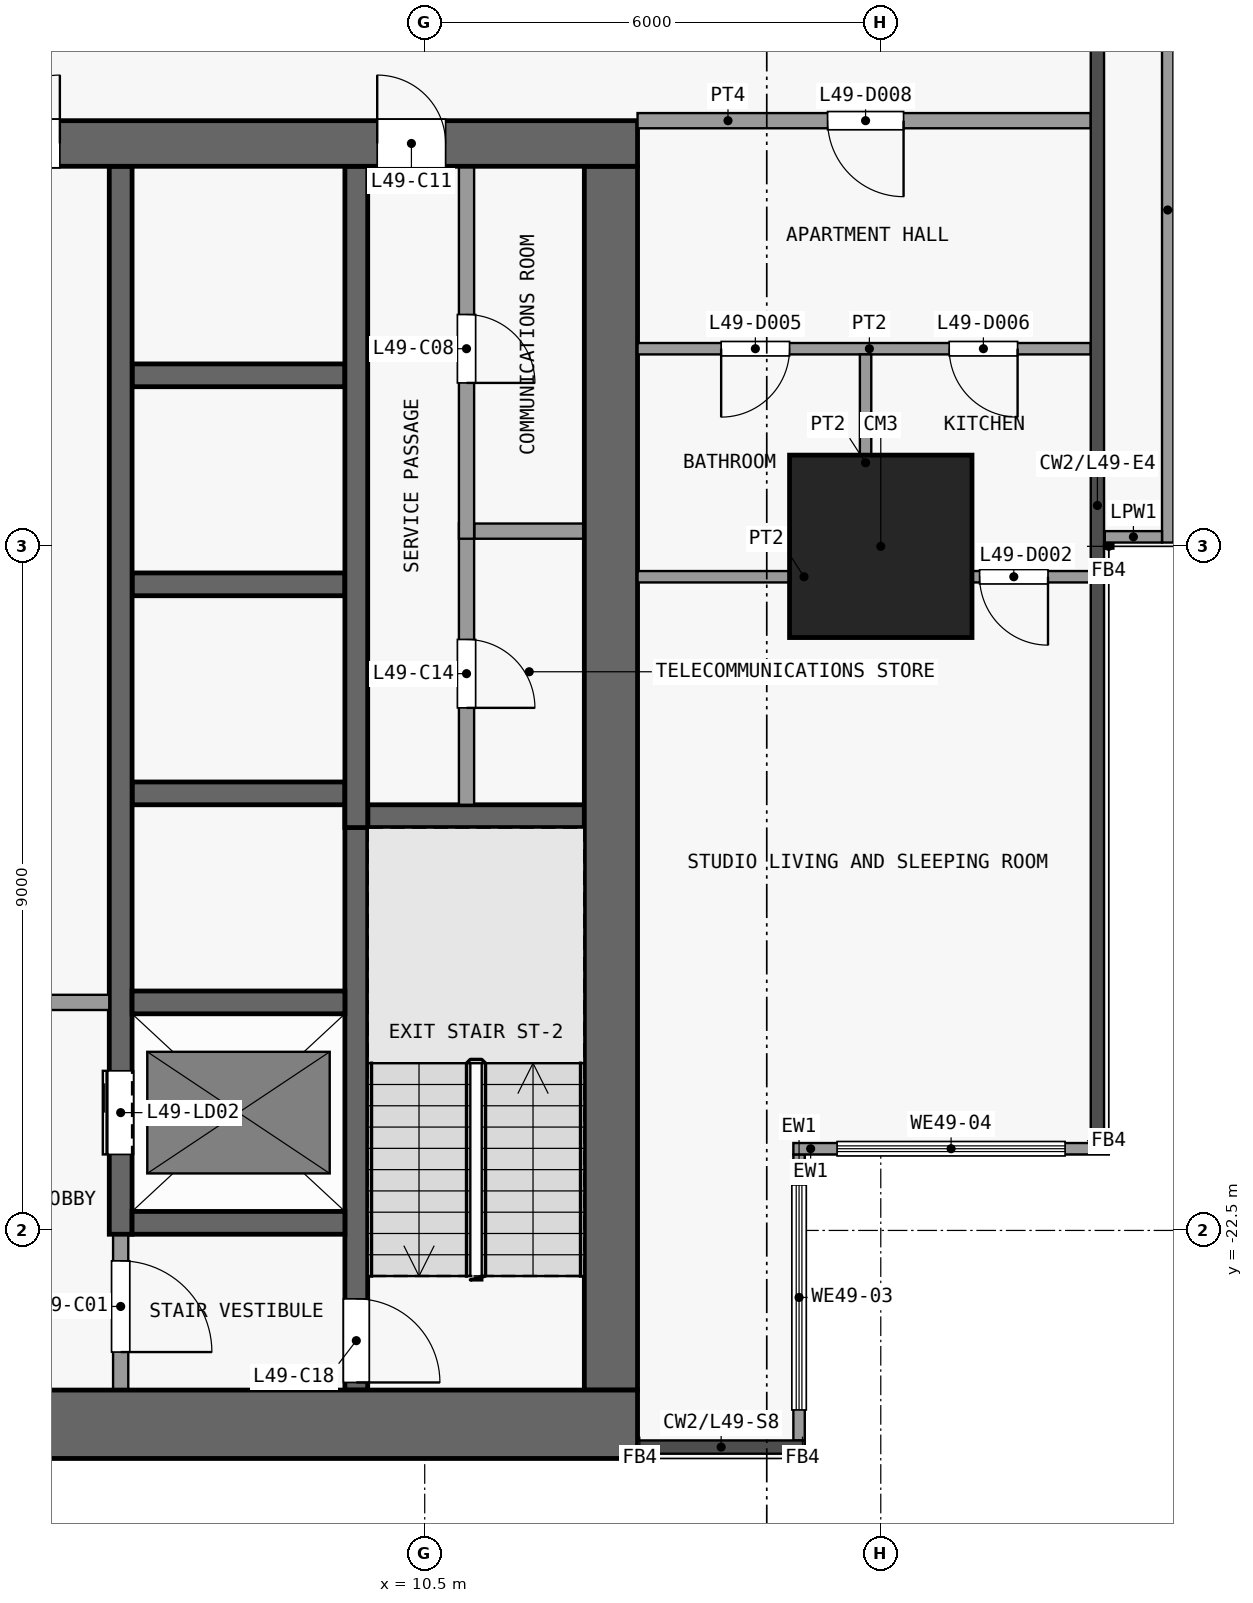
"""IFC4 building model, lengths in metres.
Left out: names, types, materials, properties, quantities, classifications, styles, units other than length and angle.
Written with IfcOpenShell. Run it as: python <this file> out.ifc"""

import sys

from ifc_helpers import new_model, si_unit, direction, frame, frame_2d, origin, origin_2d, place, context, subcontext, project, spatial, rectangle, extrude, element, fill, save


model = new_model("IFC4")
c1 = context("Model", 3, precision=1e-05, world=origin(), true_north=direction((0.0, 1.0)))
c2 = subcontext(c1, "Body", "Model", "MODEL_VIEW")
j1 = project(units=[si_unit("LENGTHUNIT", "METRE"), si_unit("PLANEANGLEUNIT", "RADIAN")], contexts=[c1])
p1 = place(None, origin())
s1 = spatial("IfcSite", under=j1, at=p1, CompositionType="ELEMENT")
p2 = place(p1, origin())
s2 = spatial("IfcBuilding", under=s1, at=p2, CompositionType="ELEMENT")
p3 = place(p2, frame((0.0, 0.0, 196.1)))
s3 = spatial("IfcBuildingStorey", under=s2, at=p3, CompositionType="ELEMENT", Elevation=196.1)
p4 = place(p3, frame((16.5, -13.5, 0.0), z_axis=(0.0, 0.0, 1.0), x_axis=(1.0, 0.0, 0.0)))
e1 = element("IfcColumn", 1, at=p4, inside=s3, PredefinedType="COLUMN", context=c2, shape_type="SweptSolid", body=[
    extrude(rectangle(XDim=2.4, YDim=2.4, at=origin_2d()), origin(), (0.0, 0.0, 1.0), 3.6),
])
p5 = place(p3, frame((-13.3, -25.05, 0.0), z_axis=(0.0, 0.0, 1.0), x_axis=(1.0, 0.0, 0.0)))
e2 = element("IfcWall", 2, at=p5, inside=s3, PredefinedType="SHEAR", context=c2, shape_type="SweptSolid", body=[
    extrude(rectangle(XDim=26.6, YDim=0.9, at=frame_2d((13.3, 0.0))), origin(), (0.0, 0.0, 1.0), 3.15),
])
p6 = place(p3, frame((-13.3, -8.2, 0.0), z_axis=(0.0, 0.0, 1.0), x_axis=(1.0, 0.0, 0.0)))
e3 = element("IfcWall", 3, at=p6, inside=s3, PredefinedType="SHEAR", context=c2, shape_type="SweptSolid", body=[
    extrude(rectangle(XDim=26.6, YDim=0.6, at=frame_2d((13.3, 0.0))), origin(), (0.0, 0.0, 1.0), 3.15),
])
p7 = place(p6, frame((7.6, 0.0, 0.0)))
e4 = element("IfcOpeningElement", 4, at=p7, cuts=e3, PredefinedType="OPENING", context=c2, shape_type="SweptSolid", body=[
    extrude(rectangle(XDim=1.8, YDim=2.1, at=frame_2d((0.9, 1.05))), frame((0.0, 0.31, 0.0), z_axis=(0.0, -1.0, 0.0), x_axis=(1.0, 0.0, 0.0)), (0.0, 0.0, 1.0), 0.62),
])
p8 = place(p6, frame((17.2, 0.0, 0.0)))
e5 = element("IfcOpeningElement", 5, at=p8, cuts=e3, PredefinedType="OPENING", context=c2, shape_type="SweptSolid", body=[
    extrude(rectangle(XDim=1.8, YDim=2.1, at=frame_2d((0.9, 1.05))), frame((0.0, 0.31, 0.0), z_axis=(0.0, -1.0, 0.0), x_axis=(1.0, 0.0, 0.0)), (0.0, 0.0, 1.0), 0.62),
])
p9 = place(p6, frame((2.525, 0.0, 0.0)))
e6 = element("IfcOpeningElement", 6, at=p9, cuts=e3, PredefinedType="OPENING", context=c2, shape_type="SweptSolid", body=[
    extrude(rectangle(XDim=0.9, YDim=2.1, at=frame_2d((0.45, 1.05))), frame((0.0, 0.31, 0.0), z_axis=(0.0, -1.0, 0.0), x_axis=(1.0, 0.0, 0.0)), (0.0, 0.0, 1.0), 0.62),
])
p10 = place(p6, frame((23.175, 0.0, 0.0)))
e7 = element("IfcOpeningElement", 7, at=p10, cuts=e3, PredefinedType="OPENING", context=c2, shape_type="SweptSolid", body=[
    extrude(rectangle(XDim=0.9, YDim=2.1, at=frame_2d((0.45, 1.05))), frame((0.0, 0.31, 0.0), z_axis=(0.0, -1.0, 0.0), x_axis=(1.0, 0.0, 0.0)), (0.0, 0.0, 1.0), 0.62),
])
p11 = place(p3, frame((12.95, -24.6, 0.0), z_axis=(0.0, 0.0, 1.0), x_axis=(0.0, 1.0, 0.0)))
e8 = element("IfcWall", 8, at=p11, inside=s3, PredefinedType="SHEAR", context=c2, shape_type="SweptSolid", body=[
    extrude(rectangle(XDim=16.1, YDim=0.7, at=frame_2d((8.05, 0.0))), origin(), (0.0, 0.0, 1.0), 3.15),
])
p12 = place(p3, frame((6.65, -22.4, 0.0), z_axis=(0.0, 0.0, 1.0), x_axis=(1.0, 0.0, 0.0)))
e9 = element("IfcWall", 9, at=p12, inside=s3, PredefinedType="SHEAR", context=c2, shape_type="SweptSolid", body=[
    extrude(rectangle(XDim=2.8, YDim=0.3, at=frame_2d((1.4, 0.0))), origin(), (0.0, 0.0, 1.0), 3.15),
])
p13 = place(p3, frame((6.35, -19.5, 0.0), z_axis=(0.0, 0.0, 1.0), x_axis=(-1.0, 0.0, 0.0)))
e10 = element("IfcWall", 10, at=p13, inside=s3, PredefinedType="PARTITIONING", context=c2, shape_type="SweptSolid", body=[
    extrude(rectangle(XDim=3.1, YDim=0.2, at=frame_2d((1.55, 0.0))), origin(), (0.0, 0.0, 1.0), 3.15),
])
p14 = place(p13, frame((0.8, 0.0, 0.0)))
e11 = element("IfcOpeningElement", 11, at=p14, cuts=e10, PredefinedType="OPENING", context=c2, shape_type="SweptSolid", body=[
    extrude(rectangle(XDim=1.5, YDim=2.1, at=frame_2d((0.75, 1.05))), frame((0.0, 0.11, 0.0), z_axis=(0.0, -1.0, 0.0), x_axis=(1.0, 0.0, 0.0)), (0.0, 0.0, 1.0), 0.22),
])
p15 = place(p3, frame((6.65, -19.5, 0.0), z_axis=(0.0, 0.0, 1.0), x_axis=(1.0, 0.0, 0.0)))
e12 = element("IfcWall", 12, at=p15, inside=s3, PredefinedType="SHEAR", context=c2, shape_type="SweptSolid", body=[
    extrude(rectangle(XDim=2.8, YDim=0.3, at=frame_2d((1.4, 0.0))), origin(), (0.0, 0.0, 1.0), 3.15),
])
p16 = place(p3, frame((9.75, -17.05, 0.0), z_axis=(0.0, 0.0, 1.0), x_axis=(1.0, 0.0, 0.0)))
e13 = element("IfcWall", 13, at=p16, inside=s3, PredefinedType="SHEAR", context=c2, shape_type="SweptSolid", body=[
    extrude(rectangle(XDim=2.85, YDim=0.3, at=frame_2d((1.425, 0.0))), origin(), (0.0, 0.0, 1.0), 3.15),
])
for number, where, z_axis, x_axis in (
    (14, (6.65, -16.75, 0.0), (0.0, 0.0, 1.0), (1.0, 0.0, 0.0)),
    (15, (6.65, -14.0, 0.0), (0.0, 0.0, 1.0), (1.0, 0.0, 0.0)),
):
    element("IfcWall", number, at=place(p3, frame(where, z_axis=z_axis, x_axis=x_axis)), inside=s3, PredefinedType="SHEAR", context=c2, shape_type="SweptSolid", body=[
        extrude(rectangle(XDim=2.8, YDim=0.3, at=frame_2d((1.4, 0.0))), origin(), (0.0, 0.0, 1.0), 3.15),
    ])
p17 = place(p3, frame((11.15, -13.3, 0.0), z_axis=(0.0, 0.0, 1.0), x_axis=(1.0, 0.0, 0.0)))
e16 = element("IfcWall", 16, at=p17, inside=s3, PredefinedType="PARTITIONING", context=c2, shape_type="SweptSolid", body=[
    extrude(rectangle(XDim=1.45, YDim=0.2, at=frame_2d((0.725, 0.0))), origin(), (0.0, 0.0, 1.0), 3.15),
])
p18 = place(p3, frame((6.65, -11.25, 0.0), z_axis=(0.0, 0.0, 1.0), x_axis=(1.0, 0.0, 0.0)))
e17 = element("IfcWall", 17, at=p18, inside=s3, PredefinedType="SHEAR", context=c2, shape_type="SweptSolid", body=[
    extrude(rectangle(XDim=2.8, YDim=0.3, at=frame_2d((1.4, 0.0))), origin(), (0.0, 0.0, 1.0), 3.15),
])
p19 = place(p3, frame((6.5, -22.55, 0.0), z_axis=(0.0, 0.0, 1.0), x_axis=(0.0, -1.0, 0.0)))
e18 = element("IfcWall", 18, at=p19, inside=s3, PredefinedType="PARTITIONING", context=c2, shape_type="SweptSolid", body=[
    extrude(rectangle(XDim=2.05, YDim=0.2, at=frame_2d((1.025, 0.0))), origin(), (0.0, 0.0, 1.0), 3.15),
])
p20 = place(p19, frame((0.35, 0.0, 0.0)))
e19 = element("IfcOpeningElement", 19, at=p20, cuts=e18, PredefinedType="OPENING", context=c2, shape_type="SweptSolid", body=[
    extrude(rectangle(XDim=1.2, YDim=2.1, at=frame_2d((0.6, 1.05))), frame((0.0, 0.11, 0.0), z_axis=(0.0, -1.0, 0.0), x_axis=(1.0, 0.0, 0.0)), (0.0, 0.0, 1.0), 0.22),
])
p21 = place(p3, frame((6.5, -22.55, 0.0), z_axis=(0.0, 0.0, 1.0), x_axis=(0.0, 1.0, 0.0)))
e20 = element("IfcWall", 20, at=p21, inside=s3, PredefinedType="SHEAR", context=c2, shape_type="SweptSolid", body=[
    extrude(rectangle(XDim=14.05, YDim=0.3, at=frame_2d((7.025, 0.0))), origin(), (0.0, 0.0, 1.0), 3.15),
])
p22 = place(p21, frame((1.05, 0.0, 0.0)))
e21 = element("IfcOpeningElement", 21, at=p22, cuts=e20, PredefinedType="OPENING", context=c2, shape_type="SweptSolid", body=[
    extrude(rectangle(XDim=1.1, YDim=2.1, at=frame_2d((0.55, 1.05))), frame((0.0, 0.16, 0.0), z_axis=(0.0, -1.0, 0.0), x_axis=(1.0, 0.0, 0.0)), (0.0, 0.0, 1.0), 0.32),
])
p23 = place(p3, frame((9.6, -16.9, 0.0), z_axis=(0.0, 0.0, 1.0), x_axis=(0.0, -1.0, 0.0)))
e22 = element("IfcWall", 22, at=p23, inside=s3, PredefinedType="SHEAR", context=c2, shape_type="SweptSolid", body=[
    extrude(rectangle(XDim=7.7, YDim=0.3, at=frame_2d((3.85, 0.0))), origin(), (0.0, 0.0, 1.0), 3.15),
])
p24 = place(p23, frame((6.5, 0.0, 0.0)))
e23 = element("IfcOpeningElement", 23, at=p24, cuts=e22, PredefinedType="OPENING", context=c2, shape_type="SweptSolid", body=[
    extrude(rectangle(XDim=1.1, YDim=2.1, at=frame_2d((0.55, 1.05))), frame((0.0, 0.16, 0.0), z_axis=(0.0, -1.0, 0.0), x_axis=(1.0, 0.0, 0.0)), (0.0, 0.0, 1.0), 0.32),
])
p25 = place(p3, frame((9.6, -17.2, 0.0), z_axis=(0.0, 0.0, 1.0), x_axis=(0.0, 1.0, 0.0)))
e24 = element("IfcWall", 24, at=p25, inside=s3, PredefinedType="SHEAR", context=c2, shape_type="SweptSolid", body=[
    extrude(rectangle(XDim=8.7, YDim=0.3, at=frame_2d((4.35, 0.0))), origin(), (0.0, 0.0, 1.0), 3.15),
])
p26 = place(p3, frame((11.05, -13.2, 0.0), z_axis=(0.0, 0.0, 1.0), x_axis=(0.0, -1.0, 0.0)))
e25 = element("IfcWall", 25, at=p26, inside=s3, PredefinedType="PARTITIONING", context=c2, shape_type="SweptSolid", body=[
    extrude(rectangle(XDim=3.7, YDim=0.2, at=frame_2d((1.85, 0.0))), origin(), (0.0, 0.0, 1.0), 3.15),
])
p27 = place(p26, frame((1.525, 0.0, 0.0)))
e26 = element("IfcOpeningElement", 26, at=p27, cuts=e25, PredefinedType="OPENING", context=c2, shape_type="SweptSolid", body=[
    extrude(rectangle(XDim=0.9, YDim=2.1, at=frame_2d((0.45, 1.05))), frame((0.0, 0.11, 0.0), z_axis=(0.0, -1.0, 0.0), x_axis=(1.0, 0.0, 0.0)), (0.0, 0.0, 1.0), 0.22),
])
p28 = place(p3, frame((11.05, -8.5, 0.0), z_axis=(0.0, 0.0, 1.0), x_axis=(0.0, -1.0, 0.0)))
e27 = element("IfcWall", 27, at=p28, inside=s3, PredefinedType="PARTITIONING", context=c2, shape_type="SweptSolid", body=[
    extrude(rectangle(XDim=4.9, YDim=0.2, at=frame_2d((2.45, 0.0))), origin(), (0.0, 0.0, 1.0), 3.15),
])
p29 = place(p28, frame((1.95, 0.0, 0.0)))
e28 = element("IfcOpeningElement", 28, at=p29, cuts=e27, PredefinedType="OPENING", context=c2, shape_type="SweptSolid", body=[
    extrude(rectangle(XDim=0.9, YDim=2.1, at=frame_2d((0.45, 1.05))), frame((0.0, 0.11, 0.0), z_axis=(0.0, -1.0, 0.0), x_axis=(1.0, 0.0, 0.0)), (0.0, 0.0, 1.0), 0.22),
])
p30 = place(p3, frame((15.425, -21.5, 0.0), z_axis=(0.0, 0.0, 1.0), x_axis=(0.0, -1.0, 0.0)))
e29 = element("IfcWall", 29, at=p30, inside=s3, PredefinedType="SOLIDWALL", context=c2, shape_type="SweptSolid", body=[
    extrude(rectangle(XDim=3.762, YDim=0.15, at=frame_2d((1.881, 0.0))), origin(), (0.0, 0.0, 1.0), 3.15),
])
p31 = place(p30, frame((0.401, 0.0, 0.9)))
e30 = element("IfcOpeningElement", 30, at=p31, cuts=e29, PredefinedType="OPENING", context=c2, shape_type="SweptSolid", body=[
    extrude(rectangle(XDim=2.96, YDim=2.4, at=frame_2d((1.48, 1.2))), frame((0.0, 0.085, 0.0), z_axis=(0.0, -1.0, 0.0), x_axis=(1.0, 0.0, 0.0)), (0.0, 0.0, 1.0), 0.17),
])
p32 = place(p3, frame((19.5, -21.425, 0.0), z_axis=(0.0, 0.0, 1.0), x_axis=(-1.0, 0.0, 0.0)))
e31 = element("IfcWall", 31, at=p32, inside=s3, PredefinedType="SOLIDWALL", context=c2, shape_type="SweptSolid", body=[
    extrude(rectangle(XDim=4.15, YDim=0.15, at=frame_2d((2.075, 0.0))), origin(), (0.0, 0.0, 1.0), 3.15),
])
p33 = place(p32, frame((0.575, 0.0, 0.9)))
e32 = element("IfcOpeningElement", 32, at=p33, cuts=e31, PredefinedType="OPENING", context=c2, shape_type="SweptSolid", body=[
    extrude(rectangle(XDim=3.0, YDim=2.4, at=frame_2d((1.5, 1.2))), frame((0.0, 0.085, 0.0), z_axis=(0.0, -1.0, 0.0), x_axis=(1.0, 0.0, 0.0)), (0.0, 0.0, 1.0), 0.17),
])
p34 = place(p3, frame((20.275, -4.7, 0.0), z_axis=(0.0, 0.0, 1.0), x_axis=(0.0, -1.0, 0.0)))
e33 = element("IfcWall", 33, at=p34, inside=s3, PredefinedType="PARAPET", context=c2, shape_type="SweptSolid", body=[
    extrude(rectangle(XDim=8.75, YDim=0.15, at=frame_2d((4.375, 0.0))), origin(), (0.0, 0.0, 1.0), 1.15),
])
p35 = place(p3, frame((20.2, -13.375, 0.0), z_axis=(0.0, 0.0, 1.0), x_axis=(-1.0, 0.0, 0.0)))
e34 = element("IfcWall", 34, at=p35, inside=s3, PredefinedType="PARAPET", context=c2, shape_type="SweptSolid", body=[
    extrude(rectangle(XDim=0.752, YDim=0.15, at=frame_2d((0.376, 0.0))), origin(), (0.0, 0.0, 1.0), 1.15),
])
p36 = place(p3, frame((13.3, -13.9, 0.0), z_axis=(0.0, 0.0, 1.0), x_axis=(1.0, 0.0, 0.0)))
e35 = element("IfcWall", 35, at=p36, inside=s3, PredefinedType="PARTITIONING", context=c2, shape_type="SweptSolid", body=[
    extrude(rectangle(XDim=5.962, YDim=0.15, at=frame_2d((2.981, 0.0))), origin(), (0.0, 0.0, 1.0), 3.15),
])
p37 = place(p36, frame((4.5, 0.0, 0.0)))
e36 = element("IfcOpeningElement", 36, at=p37, cuts=e35, PredefinedType="OPENING", context=c2, shape_type="SweptSolid", body=[
    extrude(rectangle(XDim=0.9, YDim=2.1, at=frame_2d((0.45, 1.05))), frame((0.0, 0.085, 0.0), z_axis=(0.0, -1.0, 0.0), x_axis=(1.0, 0.0, 0.0)), (0.0, 0.0, 1.0), 0.17),
])
p38 = place(p3, frame((13.3, -10.9, 0.0), z_axis=(0.0, 0.0, 1.0), x_axis=(1.0, 0.0, 0.0)))
e37 = element("IfcWall", 37, at=p38, inside=s3, PredefinedType="PARTITIONING", context=c2, shape_type="SweptSolid", body=[
    extrude(rectangle(XDim=5.962, YDim=0.15, at=frame_2d((2.981, 0.0))), origin(), (0.0, 0.0, 1.0), 3.15),
])
p39 = place(p38, frame((1.1, 0.0, 0.0)))
e38 = element("IfcOpeningElement", 38, at=p39, cuts=e37, PredefinedType="OPENING", context=c2, shape_type="SweptSolid", body=[
    extrude(rectangle(XDim=0.9, YDim=2.1, at=frame_2d((0.45, 1.05))), frame((0.0, 0.085, 0.0), z_axis=(0.0, -1.0, 0.0), x_axis=(1.0, 0.0, 0.0)), (0.0, 0.0, 1.0), 0.17),
])
p40 = place(p38, frame((4.1, 0.0, 0.0)))
e39 = element("IfcOpeningElement", 39, at=p40, cuts=e37, PredefinedType="OPENING", context=c2, shape_type="SweptSolid", body=[
    extrude(rectangle(XDim=0.9, YDim=2.1, at=frame_2d((0.45, 1.05))), frame((0.0, 0.085, 0.0), z_axis=(0.0, -1.0, 0.0), x_axis=(1.0, 0.0, 0.0)), (0.0, 0.0, 1.0), 0.17),
])
p41 = place(p3, frame((13.3, -7.9, 0.0), z_axis=(0.0, 0.0, 1.0), x_axis=(1.0, 0.0, 0.0)))
e40 = element("IfcWall", 40, at=p41, inside=s3, PredefinedType="PARTITIONING", context=c2, shape_type="SweptSolid", body=[
    extrude(rectangle(XDim=5.962, YDim=0.2, at=frame_2d((2.981, 0.0))), origin(), (0.0, 0.0, 1.0), 3.15),
])
p42 = place(p41, frame((2.5, 0.0, 0.0)))
e41 = element("IfcOpeningElement", 41, at=p42, cuts=e40, PredefinedType="OPENING", context=c2, shape_type="SweptSolid", body=[
    extrude(rectangle(XDim=1.0, YDim=2.1, at=frame_2d((0.5, 1.05))), frame((0.0, 0.11, 0.0), z_axis=(0.0, -1.0, 0.0), x_axis=(1.0, 0.0, 0.0)), (0.0, 0.0, 1.0), 0.22),
])
p43 = place(p3, frame((16.3, -13.825, 0.0), z_axis=(0.0, 0.0, 1.0), x_axis=(0.0, 1.0, 0.0)))
e42 = element("IfcWall", 42, at=p43, inside=s3, PredefinedType="PARTITIONING", context=c2, shape_type="SweptSolid", body=[
    extrude(rectangle(XDim=2.85, YDim=0.15, at=frame_2d((1.425, 0.0))), origin(), (0.0, 0.0, 1.0), 3.15),
])
p44 = place(p22, origin())
e43 = element("IfcDoor", 43, at=p44, inside=s3, OperationType="DOUBLE_DOOR_SLIDING", PredefinedType="DOOR", context=c2, shape_type="SweptSolid", body=[
    extrude(rectangle(XDim=1.1, YDim=2.1, at=frame_2d((0.55, 1.05))), frame((0.0, 0.025, 0.0), z_axis=(0.0, -1.0, 0.0), x_axis=(1.0, 0.0, 0.0)), (0.0, 0.0, 1.0), 0.05),
])
fill(e21, e43)
p45 = place(p20, origin())
e44 = element("IfcDoor", 44, at=p45, inside=s3, OperationType="SINGLE_SWING_RIGHT", PredefinedType="DOOR", context=c2, shape_type="SweptSolid", body=[
    extrude(rectangle(XDim=1.2, YDim=2.1, at=frame_2d((0.6, 1.05))), frame((0.0, 0.025, 0.0), z_axis=(0.0, -1.0, 0.0), x_axis=(1.0, 0.0, 0.0)), (0.0, 0.0, 1.0), 0.05),
])
fill(e19, e44)
p46 = place(p8, origin())
e45 = element("IfcDoor", 45, at=p46, inside=s3, OperationType="DOUBLE_DOOR_SINGLE_SWING", PredefinedType="DOOR", context=c2, shape_type="SweptSolid", body=[
    extrude(rectangle(XDim=1.8, YDim=2.1, at=frame_2d((0.9, 1.05))), frame((0.0, 0.025, 0.0), z_axis=(0.0, -1.0, 0.0), x_axis=(1.0, 0.0, 0.0)), (0.0, 0.0, 1.0), 0.05),
])
fill(e5, e45)
p47 = place(p29, origin())
e46 = element("IfcDoor", 46, at=p47, inside=s3, OperationType="SINGLE_SWING_RIGHT", PredefinedType="DOOR", context=c2, shape_type="SweptSolid", body=[
    extrude(rectangle(XDim=0.9, YDim=2.1, at=frame_2d((0.45, 1.05))), frame((0.0, 0.025, 0.0), z_axis=(0.0, -1.0, 0.0), x_axis=(1.0, 0.0, 0.0)), (0.0, 0.0, 1.0), 0.05),
])
fill(e28, e46)
p48 = place(p10, origin())
e47 = element("IfcDoor", 47, at=p48, inside=s3, OperationType="SINGLE_SWING_LEFT", PredefinedType="DOOR", context=c2, shape_type="SweptSolid", body=[
    extrude(rectangle(XDim=0.9, YDim=2.1, at=frame_2d((0.45, 1.05))), frame((0.0, 0.025, 0.0), z_axis=(0.0, -1.0, 0.0), x_axis=(1.0, 0.0, 0.0)), (0.0, 0.0, 1.0), 0.05),
])
fill(e7, e47)
p49 = place(p27, origin())
e48 = element("IfcDoor", 48, at=p49, inside=s3, OperationType="SINGLE_SWING_RIGHT", PredefinedType="DOOR", context=c2, shape_type="SweptSolid", body=[
    extrude(rectangle(XDim=0.9, YDim=2.1, at=frame_2d((0.45, 1.05))), frame((0.0, 0.025, 0.0), z_axis=(0.0, -1.0, 0.0), x_axis=(1.0, 0.0, 0.0)), (0.0, 0.0, 1.0), 0.05),
])
fill(e26, e48)
p50 = place(p24, origin())
e49 = element("IfcDoor", 49, at=p50, inside=s3, OperationType="SINGLE_SWING_RIGHT", PredefinedType="DOOR", context=c2, shape_type="SweptSolid", body=[
    extrude(rectangle(XDim=1.1, YDim=2.1, at=frame_2d((0.55, 1.05))), frame((0.0, 0.025, 0.0), z_axis=(0.0, -1.0, 0.0), x_axis=(1.0, 0.0, 0.0)), (0.0, 0.0, 1.0), 0.05),
])
fill(e23, e49)
p51 = place(p31, origin())
e50 = element("IfcWindow", 50, at=p51, inside=s3, PartitioningType="SINGLE_PANEL", PredefinedType="WINDOW", context=c2, shape_type="SweptSolid", body=[
    extrude(rectangle(XDim=2.96, YDim=2.4, at=frame_2d((1.48, 1.2))), frame((0.0, 0.03, 0.0), z_axis=(0.0, -1.0, 0.0), x_axis=(1.0, 0.0, 0.0)), (0.0, 0.0, 1.0), 0.06),
])
fill(e30, e50)
p52 = place(p33, origin())
e51 = element("IfcWindow", 51, at=p52, inside=s3, PartitioningType="SINGLE_PANEL", PredefinedType="WINDOW", context=c2, shape_type="SweptSolid", body=[
    extrude(rectangle(XDim=3.0, YDim=2.4, at=frame_2d((1.5, 1.2))), frame((0.0, 0.03, 0.0), z_axis=(0.0, -1.0, 0.0), x_axis=(1.0, 0.0, 0.0)), (0.0, 0.0, 1.0), 0.06),
])
fill(e32, e51)
p53 = place(p37, origin())
e52 = element("IfcDoor", 52, at=p53, inside=s3, OperationType="SINGLE_SWING_RIGHT", PredefinedType="DOOR", context=c2, shape_type="SweptSolid", body=[
    extrude(rectangle(XDim=0.9, YDim=2.1, at=frame_2d((0.45, 1.05))), frame((0.0, 0.025, 0.0), z_axis=(0.0, -1.0, 0.0), x_axis=(1.0, 0.0, 0.0)), (0.0, 0.0, 1.0), 0.05),
])
fill(e36, e52)
p54 = place(p39, origin())
e53 = element("IfcDoor", 53, at=p54, inside=s3, OperationType="SINGLE_SWING_LEFT", PredefinedType="DOOR", context=c2, shape_type="SweptSolid", body=[
    extrude(rectangle(XDim=0.9, YDim=2.1, at=frame_2d((0.45, 1.05))), frame((0.0, 0.025, 0.0), z_axis=(0.0, -1.0, 0.0), x_axis=(1.0, 0.0, 0.0)), (0.0, 0.0, 1.0), 0.05),
])
fill(e38, e53)
p55 = place(p40, origin())
e54 = element("IfcDoor", 54, at=p55, inside=s3, OperationType="SINGLE_SWING_RIGHT", PredefinedType="DOOR", context=c2, shape_type="SweptSolid", body=[
    extrude(rectangle(XDim=0.9, YDim=2.1, at=frame_2d((0.45, 1.05))), frame((0.0, 0.025, 0.0), z_axis=(0.0, -1.0, 0.0), x_axis=(1.0, 0.0, 0.0)), (0.0, 0.0, 1.0), 0.05),
])
fill(e39, e54)
p56 = place(p42, origin())
e55 = element("IfcDoor", 55, at=p56, inside=s3, OperationType="SINGLE_SWING_RIGHT", PredefinedType="DOOR", context=c2, shape_type="SweptSolid", body=[
    extrude(rectangle(XDim=1.0, YDim=2.1, at=frame_2d((0.5, 1.05))), frame((0.0, 0.025, 0.0), z_axis=(0.0, -1.0, 0.0), x_axis=(1.0, 0.0, 0.0)), (0.0, 0.0, 1.0), 0.05),
])
fill(e41, e55)
save(model, sys.argv[1])
